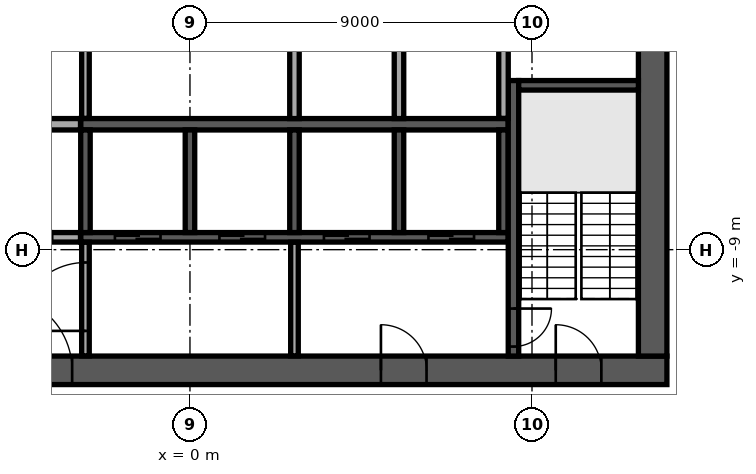
"""IFC4 building model, lengths in metres.
Left out: names, types, materials, properties, quantities, classifications, styles, units other than length and angle.
Written with IfcOpenShell. Run it as: python <this file> out.ifc"""

import sys

from ifc_helpers import new_model, si_unit, direction, frame, frame_2d, origin, place, context, subcontext, project, spatial, rectangle, extrude, element, fill, save


model = new_model("IFC4")
c1 = context("Model", 3, precision=1e-05, world=origin(), true_north=direction((0.0, 1.0)))
c2 = subcontext(c1, "Body", "Model", "MODEL_VIEW")
j1 = project(units=[si_unit("LENGTHUNIT", "METRE"), si_unit("PLANEANGLEUNIT", "RADIAN")], contexts=[c1])
p1 = place(None, origin())
s1 = spatial("IfcSite", under=j1, at=p1, CompositionType="ELEMENT")
p2 = place(p1, origin())
s2 = spatial("IfcBuilding", under=s1, at=p2, CompositionType="ELEMENT")
p3 = place(p2, frame((0.0, 0.0, 246.9)))
s3 = spatial("IfcBuildingStorey", under=s2, at=p3, CompositionType="ELEMENT", Elevation=246.9)
p4 = place(p3, frame((-12.55, -12.175, 0.0), z_axis=(0.0, 0.0, 1.0), x_axis=(1.0, 0.0, 0.0)))
e1 = element("IfcWall", 1, at=p4, inside=s3, PredefinedType="SHEAR", context=c2, shape_type="SweptSolid", body=[
    extrude(rectangle(XDim=25.1, YDim=0.75, at=frame_2d((12.55, 0.0))), origin(), (0.0, 0.0, 1.0), 3.64),
])
p5 = place(p4, frame((7.45, 0.0, 0.0)))
e2 = element("IfcOpeningElement", 2, at=p5, cuts=e1, PredefinedType="OPENING", context=c2, shape_type="SweptSolid", body=[
    extrude(rectangle(XDim=2.0, YDim=2.1, at=frame_2d((1.0, 1.05))), frame((0.0, 0.385, 0.0), z_axis=(0.0, -1.0, 0.0), x_axis=(1.0, 0.0, 0.0)), (0.0, 0.0, 1.0), 0.77),
])
p6 = place(p4, frame((17.575, 0.0, 0.0)))
e3 = element("IfcOpeningElement", 3, at=p6, cuts=e1, PredefinedType="OPENING", context=c2, shape_type="SweptSolid", body=[
    extrude(rectangle(XDim=1.2, YDim=2.1, at=frame_2d((0.6, 1.05))), frame((0.0, 0.385, 0.0), z_axis=(0.0, -1.0, 0.0), x_axis=(1.0, 0.0, 0.0)), (0.0, 0.0, 1.0), 0.77),
])
p7 = place(p4, frame((1.725, 0.0, 0.0)))
e4 = element("IfcOpeningElement", 4, at=p7, cuts=e1, PredefinedType="OPENING", context=c2, shape_type="SweptSolid", body=[
    extrude(rectangle(XDim=1.2, YDim=2.1, at=frame_2d((0.6, 1.05))), frame((0.0, 0.385, 0.0), z_axis=(0.0, -1.0, 0.0), x_axis=(1.0, 0.0, 0.0)), (0.0, 0.0, 1.0), 0.77),
])
p8 = place(p4, frame((22.175, 0.0, 0.0)))
e5 = element("IfcOpeningElement", 5, at=p8, cuts=e1, PredefinedType="OPENING", context=c2, shape_type="SweptSolid", body=[
    extrude(rectangle(XDim=1.2, YDim=2.1, at=frame_2d((0.6, 1.05))), frame((0.0, 0.385, 0.0), z_axis=(0.0, -1.0, 0.0), x_axis=(1.0, 0.0, 0.0)), (0.0, 0.0, 1.0), 0.77),
])
p9 = place(p3, frame((12.175, -11.8, 0.0), z_axis=(0.0, 0.0, 1.0), x_axis=(0.0, 1.0, 0.0)))
e6 = element("IfcWall", 6, at=p9, inside=s3, PredefinedType="SHEAR", context=c2, shape_type="SweptSolid", body=[
    extrude(rectangle(XDim=23.6, YDim=0.75, at=frame_2d((11.8, 0.0))), origin(), (0.0, 0.0, 1.0), 3.64),
])
p10 = place(p9, frame((10.6, 0.0, 0.0)))
e7 = element("IfcOpeningElement", 7, at=p10, cuts=e6, PredefinedType="OPENING", context=c2, shape_type="SweptSolid", body=[
    extrude(rectangle(XDim=2.4, YDim=2.4, at=frame_2d((1.2, 1.2))), frame((0.0, 0.385, 0.0), z_axis=(0.0, -1.0, 0.0), x_axis=(1.0, 0.0, 0.0)), (0.0, 0.0, 1.0), 0.77),
])
p11 = place(p3, frame((-2.875, -5.7, 0.0), z_axis=(0.0, 0.0, 1.0), x_axis=(1.0, 0.0, 0.0)))
e8 = element("IfcWall", 8, at=p11, inside=s3, PredefinedType="SOLIDWALL", context=c2, shape_type="SweptSolid", body=[
    extrude(rectangle(XDim=11.25, YDim=0.3, at=frame_2d((5.625, 0.0))), origin(), (0.0, 0.0, 1.0), 3.64),
])
for number, where, z_axis, x_axis in (
    (9, (2.75, -5.55, 0.0), (0.0, 0.0, 1.0), (0.0, 1.0, 0.0)),
    (10, (5.5, -5.55, 0.0), (0.0, 0.0, 1.0), (0.0, 1.0, 0.0)),
):
    element("IfcWall", number, at=place(p3, frame(where, z_axis=z_axis, x_axis=x_axis)), inside=s3, PredefinedType="SOLIDWALL", context=c2, shape_type="SweptSolid", body=[
        extrude(rectangle(XDim=2.7, YDim=0.25, at=frame_2d((1.35, 0.0))), origin(), (0.0, 0.0, 1.0), 3.64),
    ])
p12 = place(p3, frame((-2.875, -8.675, 0.0), z_axis=(0.0, 0.0, 1.0), x_axis=(1.0, 0.0, 0.0)))
e11 = element("IfcWall", 11, at=p12, inside=s3, PredefinedType="SOLIDWALL", context=c2, shape_type="SweptSolid", body=[
    extrude(rectangle(XDim=11.25, YDim=0.25, at=frame_2d((5.625, 0.0))), origin(), (0.0, 0.0, 1.0), 3.64),
])
p13 = place(p12, frame((0.9, 0.0, 0.0)))
e12 = element("IfcOpeningElement", 12, at=p13, cuts=e11, PredefinedType="OPENING", context=c2, shape_type="SweptSolid", body=[
    extrude(rectangle(XDim=1.2, YDim=2.1, at=frame_2d((0.6, 1.05))), frame((0.0, 0.135, 0.0), z_axis=(0.0, -1.0, 0.0), x_axis=(1.0, 0.0, 0.0)), (0.0, 0.0, 1.0), 0.27),
])
p14 = place(p12, frame((3.65, 0.0, 0.0)))
e13 = element("IfcOpeningElement", 13, at=p14, cuts=e11, PredefinedType="OPENING", context=c2, shape_type="SweptSolid", body=[
    extrude(rectangle(XDim=1.2, YDim=2.1, at=frame_2d((0.6, 1.05))), frame((0.0, 0.135, 0.0), z_axis=(0.0, -1.0, 0.0), x_axis=(1.0, 0.0, 0.0)), (0.0, 0.0, 1.0), 0.27),
])
p15 = place(p12, frame((6.4, 0.0, 0.0)))
e14 = element("IfcOpeningElement", 14, at=p15, cuts=e11, PredefinedType="OPENING", context=c2, shape_type="SweptSolid", body=[
    extrude(rectangle(XDim=1.2, YDim=2.1, at=frame_2d((0.6, 1.05))), frame((0.0, 0.135, 0.0), z_axis=(0.0, -1.0, 0.0), x_axis=(1.0, 0.0, 0.0)), (0.0, 0.0, 1.0), 0.27),
])
p16 = place(p12, frame((9.15, 0.0, 0.0)))
e15 = element("IfcOpeningElement", 15, at=p16, cuts=e11, PredefinedType="OPENING", context=c2, shape_type="SweptSolid", body=[
    extrude(rectangle(XDim=1.2, YDim=2.1, at=frame_2d((0.6, 1.05))), frame((0.0, 0.135, 0.0), z_axis=(0.0, -1.0, 0.0), x_axis=(1.0, 0.0, 0.0)), (0.0, 0.0, 1.0), 0.27),
])
for number, where, z_axis, x_axis in (
    (16, (-2.75, -8.55, 0.0), (0.0, 0.0, 1.0), (0.0, 1.0, 0.0)),
    (17, (0.0, -8.55, 0.0), (0.0, 0.0, 1.0), (0.0, 1.0, 0.0)),
    (18, (2.75, -8.55, 0.0), (0.0, 0.0, 1.0), (0.0, 1.0, 0.0)),
    (19, (5.5, -8.55, 0.0), (0.0, 0.0, 1.0), (0.0, 1.0, 0.0)),
    (20, (8.25, -8.55, 0.0), (0.0, 0.0, 1.0), (0.0, 1.0, 0.0)),
):
    element("IfcWall", number, at=place(p3, frame(where, z_axis=z_axis, x_axis=x_axis)), inside=s3, PredefinedType="SOLIDWALL", context=c2, shape_type="SweptSolid", body=[
        extrude(rectangle(XDim=2.7, YDim=0.25, at=frame_2d((1.35, 0.0))), origin(), (0.0, 0.0, 1.0), 3.64),
    ])
p17 = place(p3, frame((8.512, -4.55, 0.0), z_axis=(0.0, 0.0, 1.0), x_axis=(0.0, -1.0, 0.0)))
e21 = element("IfcWall", 21, at=p17, inside=s3, PredefinedType="SOLIDWALL", context=c2, shape_type="SweptSolid", body=[
    extrude(rectangle(XDim=7.25, YDim=0.275, at=frame_2d((3.625, 0.0))), origin(), (0.0, 0.0, 1.0), 3.64),
])
p18 = place(p17, frame((6.0, 0.0, 0.0)))
e22 = element("IfcOpeningElement", 22, at=p18, cuts=e21, PredefinedType="OPENING", context=c2, shape_type="SweptSolid", body=[
    extrude(rectangle(XDim=1.0, YDim=2.1, at=frame_2d((0.5, 1.05))), frame((0.0, 0.147, 0.0), z_axis=(0.0, -1.0, 0.0), x_axis=(1.0, 0.0, 0.0)), (0.0, 0.0, 1.0), 0.295),
])
p19 = place(p3, frame((8.65, -4.675, 0.0), z_axis=(0.0, 0.0, 1.0), x_axis=(1.0, 0.0, 0.0)))
e23 = element("IfcWall", 23, at=p19, inside=s3, PredefinedType="SOLIDWALL", context=c2, shape_type="SweptSolid", body=[
    extrude(rectangle(XDim=3.15, YDim=0.25, at=frame_2d((1.575, 0.0))), origin(), (0.0, 0.0, 1.0), 3.64),
])
p20 = place(p3, frame((-2.75, -11.795, 0.0), z_axis=(0.0, 0.0, 1.0), x_axis=(0.0, 1.0, 0.0)))
e24 = element("IfcWall", 24, at=p20, inside=s3, PredefinedType="PARTITIONING", context=c2, shape_type="SweptSolid", body=[
    extrude(rectangle(XDim=2.99, YDim=0.2, at=frame_2d((1.495, 0.0))), origin(), (0.0, 0.0, 1.0), 3.64),
])
p21 = place(p20, frame((0.657, 0.0, 0.0)))
e25 = element("IfcOpeningElement", 25, at=p21, cuts=e24, PredefinedType="OPENING", context=c2, shape_type="SweptSolid", body=[
    extrude(rectangle(XDim=1.8, YDim=2.1, at=frame_2d((0.9, 1.05))), frame((0.0, 0.11, 0.0), z_axis=(0.0, -1.0, 0.0), x_axis=(1.0, 0.0, 0.0)), (0.0, 0.0, 1.0), 0.22),
])
p22 = place(p3, frame((2.75, -11.795, 0.0), z_axis=(0.0, 0.0, 1.0), x_axis=(0.0, 1.0, 0.0)))
e26 = element("IfcWall", 26, at=p22, inside=s3, PredefinedType="PARTITIONING", context=c2, shape_type="SweptSolid", body=[
    extrude(rectangle(XDim=2.99, YDim=0.2, at=frame_2d((1.495, 0.0))), origin(), (0.0, 0.0, 1.0), 3.64),
])
p23 = place(p3, frame((-8.37, -8.675, 0.0), z_axis=(0.0, 0.0, 1.0), x_axis=(1.0, 0.0, 0.0)))
e27 = element("IfcWall", 27, at=p23, inside=s3, PredefinedType="PARTITIONING", context=c2, shape_type="SweptSolid", body=[
    extrude(rectangle(XDim=5.49, YDim=0.25, at=frame_2d((2.745, 0.0))), origin(), (0.0, 0.0, 1.0), 3.64),
])
p24 = place(p23, frame((0.995, 0.0, 0.0)))
e28 = element("IfcOpeningElement", 28, at=p24, cuts=e27, PredefinedType="OPENING", context=c2, shape_type="SweptSolid", body=[
    extrude(rectangle(XDim=1.0, YDim=2.1, at=frame_2d((0.5, 1.05))), frame((0.0, 0.135, 0.0), z_axis=(0.0, -1.0, 0.0), x_axis=(1.0, 0.0, 0.0)), (0.0, 0.0, 1.0), 0.27),
])
p25 = place(p23, frame((3.745, 0.0, 0.0)))
e29 = element("IfcOpeningElement", 29, at=p25, cuts=e27, PredefinedType="OPENING", context=c2, shape_type="SweptSolid", body=[
    extrude(rectangle(XDim=1.0, YDim=2.1, at=frame_2d((0.5, 1.05))), frame((0.0, 0.135, 0.0), z_axis=(0.0, -1.0, 0.0), x_axis=(1.0, 0.0, 0.0)), (0.0, 0.0, 1.0), 0.27),
])
p26 = place(p3, frame((-8.35, -5.7, 0.0), z_axis=(0.0, 0.0, 1.0), x_axis=(1.0, 0.0, 0.0)))
e30 = element("IfcWall", 30, at=p26, inside=s3, PredefinedType="PARTITIONING", context=c2, shape_type="SweptSolid", body=[
    extrude(rectangle(XDim=5.47, YDim=0.3, at=frame_2d((2.735, 0.0))), origin(), (0.0, 0.0, 1.0), 3.64),
])
p27 = place(p3, frame((-2.75, -5.545, 0.0), z_axis=(0.0, 0.0, 1.0), x_axis=(0.0, 1.0, 0.0)))
e31 = element("IfcWall", 31, at=p27, inside=s3, PredefinedType="PARTITIONING", context=c2, shape_type="SweptSolid", body=[
    extrude(rectangle(XDim=2.69, YDim=0.2, at=frame_2d((1.345, 0.0))), origin(), (0.0, 0.0, 1.0), 3.64),
])
p28 = place(p3, frame((8.25, -5.545, 0.0), z_axis=(0.0, 0.0, 1.0), x_axis=(0.0, 1.0, 0.0)))
e32 = element("IfcWall", 32, at=p28, inside=s3, PredefinedType="PARTITIONING", context=c2, shape_type="SweptSolid", body=[
    extrude(rectangle(XDim=2.69, YDim=0.25, at=frame_2d((1.345, 0.0))), origin(), (0.0, 0.0, 1.0), 3.64),
])
p29 = place(p3, frame((5.206, -33.362, 0.0), z_axis=(0.0, 0.0, 1.0), x_axis=(0.573577438409, 0.81915134264, 0.0)))
e33 = element("IfcWall", 33, at=p29, inside=s3, PredefinedType="STANDARD", context=c2, shape_type="SweptSolid", body=[
    extrude(rectangle(XDim=48.686, YDim=0.6, at=frame_2d((24.343, 0.0))), origin(), (0.0, 0.0, 1.0), 3.64),
])
p30 = place(p29, frame((1.213, 0.0, 0.9)))
e34 = element("IfcOpeningElement", 34, at=p30, cuts=e33, PredefinedType="OPENING", context=c2, shape_type="SweptSolid", body=[
    extrude(rectangle(XDim=2.0, YDim=2.1, at=frame_2d((1.0, 1.05))), frame((0.0, 0.31, 0.0), z_axis=(0.0, -1.0, 0.0), x_axis=(1.0, 0.0, 0.0)), (0.0, 0.0, 1.0), 0.62),
])
p31 = place(p29, frame((5.639, 0.0, 0.9)))
e35 = element("IfcOpeningElement", 35, at=p31, cuts=e33, PredefinedType="OPENING", context=c2, shape_type="SweptSolid", body=[
    extrude(rectangle(XDim=2.0, YDim=2.1, at=frame_2d((1.0, 1.05))), frame((0.0, 0.31, 0.0), z_axis=(0.0, -1.0, 0.0), x_axis=(1.0, 0.0, 0.0)), (0.0, 0.0, 1.0), 0.62),
])
p32 = place(p29, frame((10.065, 0.0, 0.9)))
e36 = element("IfcOpeningElement", 36, at=p32, cuts=e33, PredefinedType="OPENING", context=c2, shape_type="SweptSolid", body=[
    extrude(rectangle(XDim=2.0, YDim=2.1, at=frame_2d((1.0, 1.05))), frame((0.0, 0.31, 0.0), z_axis=(0.0, -1.0, 0.0), x_axis=(1.0, 0.0, 0.0)), (0.0, 0.0, 1.0), 0.62),
])
p33 = place(p29, frame((14.491, 0.0, 0.9)))
e37 = element("IfcOpeningElement", 37, at=p33, cuts=e33, PredefinedType="OPENING", context=c2, shape_type="SweptSolid", body=[
    extrude(rectangle(XDim=2.0, YDim=2.1, at=frame_2d((1.0, 1.05))), frame((0.0, 0.31, 0.0), z_axis=(0.0, -1.0, 0.0), x_axis=(1.0, 0.0, 0.0)), (0.0, 0.0, 1.0), 0.62),
])
p34 = place(p29, frame((18.917, 0.0, 0.9)))
e38 = element("IfcOpeningElement", 38, at=p34, cuts=e33, PredefinedType="OPENING", context=c2, shape_type="SweptSolid", body=[
    extrude(rectangle(XDim=2.0, YDim=2.1, at=frame_2d((1.0, 1.05))), frame((0.0, 0.31, 0.0), z_axis=(0.0, -1.0, 0.0), x_axis=(1.0, 0.0, 0.0)), (0.0, 0.0, 1.0), 0.62),
])
p35 = place(p29, frame((23.343, 0.0, 0.9)))
e39 = element("IfcOpeningElement", 39, at=p35, cuts=e33, PredefinedType="OPENING", context=c2, shape_type="SweptSolid", body=[
    extrude(rectangle(XDim=2.0, YDim=2.1, at=frame_2d((1.0, 1.05))), frame((0.0, 0.31, 0.0), z_axis=(0.0, -1.0, 0.0), x_axis=(1.0, 0.0, 0.0)), (0.0, 0.0, 1.0), 0.62),
])
p36 = place(p29, frame((27.769, 0.0, 0.9)))
e40 = element("IfcOpeningElement", 40, at=p36, cuts=e33, PredefinedType="OPENING", context=c2, shape_type="SweptSolid", body=[
    extrude(rectangle(XDim=2.0, YDim=2.1, at=frame_2d((1.0, 1.05))), frame((0.0, 0.31, 0.0), z_axis=(0.0, -1.0, 0.0), x_axis=(1.0, 0.0, 0.0)), (0.0, 0.0, 1.0), 0.62),
])
p37 = place(p29, frame((32.195, 0.0, 0.9)))
e41 = element("IfcOpeningElement", 41, at=p37, cuts=e33, PredefinedType="OPENING", context=c2, shape_type="SweptSolid", body=[
    extrude(rectangle(XDim=2.0, YDim=2.1, at=frame_2d((1.0, 1.05))), frame((0.0, 0.31, 0.0), z_axis=(0.0, -1.0, 0.0), x_axis=(1.0, 0.0, 0.0)), (0.0, 0.0, 1.0), 0.62),
])
p38 = place(p29, frame((36.621, 0.0, 0.9)))
e42 = element("IfcOpeningElement", 42, at=p38, cuts=e33, PredefinedType="OPENING", context=c2, shape_type="SweptSolid", body=[
    extrude(rectangle(XDim=2.0, YDim=2.1, at=frame_2d((1.0, 1.05))), frame((0.0, 0.31, 0.0), z_axis=(0.0, -1.0, 0.0), x_axis=(1.0, 0.0, 0.0)), (0.0, 0.0, 1.0), 0.62),
])
p39 = place(p29, frame((41.047, 0.0, 0.9)))
e43 = element("IfcOpeningElement", 43, at=p39, cuts=e33, PredefinedType="OPENING", context=c2, shape_type="SweptSolid", body=[
    extrude(rectangle(XDim=2.0, YDim=2.1, at=frame_2d((1.0, 1.05))), frame((0.0, 0.31, 0.0), z_axis=(0.0, -1.0, 0.0), x_axis=(1.0, 0.0, 0.0)), (0.0, 0.0, 1.0), 0.62),
])
p40 = place(p29, frame((45.473, 0.0, 0.9)))
e44 = element("IfcOpeningElement", 44, at=p40, cuts=e33, PredefinedType="OPENING", context=c2, shape_type="SweptSolid", body=[
    extrude(rectangle(XDim=2.0, YDim=2.1, at=frame_2d((1.0, 1.05))), frame((0.0, 0.31, 0.0), z_axis=(0.0, -1.0, 0.0), x_axis=(1.0, 0.0, 0.0)), (0.0, 0.0, 1.0), 0.62),
])
p41 = place(p3, frame((-26.231, -7.537, 0.0), z_axis=(0.0, 0.0, 1.0), x_axis=(0.819166569978, -0.573555690959, 0.0)))
e45 = element("IfcWall", 45, at=p41, inside=s3, PredefinedType="PARTITIONING", context=c2, shape_type="SweptSolid", body=[
    extrude(rectangle(XDim=34.403, YDim=0.15, at=frame_2d((17.201, 0.0))), origin(), (0.0, 0.0, 1.0), 3.24),
])
p42 = place(p41, frame((3.05, 0.0, 0.0)))
e46 = element("IfcOpeningElement", 46, at=p42, cuts=e45, PredefinedType="OPENING", context=c2, shape_type="SweptSolid", body=[
    extrude(rectangle(XDim=1.8, YDim=2.1, at=frame_2d((0.9, 1.05))), frame((0.0, 0.085, 0.0), z_axis=(0.0, -1.0, 0.0), x_axis=(1.0, 0.0, 0.0)), (0.0, 0.0, 1.0), 0.17),
])
p43 = place(p41, frame((13.103, 0.0, 0.0)))
e47 = element("IfcOpeningElement", 47, at=p43, cuts=e45, PredefinedType="OPENING", context=c2, shape_type="SweptSolid", body=[
    extrude(rectangle(XDim=1.0, YDim=2.1, at=frame_2d((0.5, 1.05))), frame((0.0, 0.085, 0.0), z_axis=(0.0, -1.0, 0.0), x_axis=(1.0, 0.0, 0.0)), (0.0, 0.0, 1.0), 0.17),
])
p44 = place(p41, frame((19.173, 0.0, 0.0)))
e48 = element("IfcOpeningElement", 48, at=p44, cuts=e45, PredefinedType="OPENING", context=c2, shape_type="SweptSolid", body=[
    extrude(rectangle(XDim=1.0, YDim=2.1, at=frame_2d((0.5, 1.05))), frame((0.0, 0.085, 0.0), z_axis=(0.0, -1.0, 0.0), x_axis=(1.0, 0.0, 0.0)), (0.0, 0.0, 1.0), 0.17),
])
p45 = place(p5, origin())
e49 = element("IfcDoor", 49, at=p45, inside=s3, OperationType="SINGLE_SWING_LEFT", PredefinedType="DOOR", context=c2, shape_type="SweptSolid", body=[
    extrude(rectangle(XDim=2.0, YDim=2.1, at=frame_2d((1.0, 1.05))), frame((0.0, 0.025, 0.0), z_axis=(0.0, -1.0, 0.0), x_axis=(1.0, 0.0, 0.0)), (0.0, 0.0, 1.0), 0.05),
])
fill(e2, e49)
p46 = place(p6, origin())
e50 = element("IfcDoor", 50, at=p46, inside=s3, OperationType="SINGLE_SWING_LEFT", PredefinedType="DOOR", context=c2, shape_type="SweptSolid", body=[
    extrude(rectangle(XDim=1.2, YDim=2.1, at=frame_2d((0.6, 1.05))), frame((0.0, 0.025, 0.0), z_axis=(0.0, -1.0, 0.0), x_axis=(1.0, 0.0, 0.0)), (0.0, 0.0, 1.0), 0.05),
])
fill(e3, e50)
p47 = place(p8, origin())
e51 = element("IfcDoor", 51, at=p47, inside=s3, OperationType="SINGLE_SWING_LEFT", PredefinedType="DOOR", context=c2, shape_type="SweptSolid", body=[
    extrude(rectangle(XDim=1.2, YDim=2.1, at=frame_2d((0.6, 1.05))), frame((0.0, 0.025, 0.0), z_axis=(0.0, -1.0, 0.0), x_axis=(1.0, 0.0, 0.0)), (0.0, 0.0, 1.0), 0.05),
])
fill(e5, e51)
p48 = place(p13, origin())
e52 = element("IfcDoor", 52, at=p48, inside=s3, OperationType="DOUBLE_DOOR_SLIDING", PredefinedType="DOOR", context=c2, shape_type="SweptSolid", body=[
    extrude(rectangle(XDim=1.2, YDim=2.1, at=frame_2d((0.6, 1.05))), frame((0.0, 0.025, 0.0), z_axis=(0.0, -1.0, 0.0), x_axis=(1.0, 0.0, 0.0)), (0.0, 0.0, 1.0), 0.05),
])
fill(e12, e52)
p49 = place(p14, origin())
e53 = element("IfcDoor", 53, at=p49, inside=s3, OperationType="DOUBLE_DOOR_SLIDING", PredefinedType="DOOR", context=c2, shape_type="SweptSolid", body=[
    extrude(rectangle(XDim=1.2, YDim=2.1, at=frame_2d((0.6, 1.05))), frame((0.0, 0.025, 0.0), z_axis=(0.0, -1.0, 0.0), x_axis=(1.0, 0.0, 0.0)), (0.0, 0.0, 1.0), 0.05),
])
fill(e13, e53)
p50 = place(p15, origin())
e54 = element("IfcDoor", 54, at=p50, inside=s3, OperationType="DOUBLE_DOOR_SLIDING", PredefinedType="DOOR", context=c2, shape_type="SweptSolid", body=[
    extrude(rectangle(XDim=1.2, YDim=2.1, at=frame_2d((0.6, 1.05))), frame((0.0, 0.025, 0.0), z_axis=(0.0, -1.0, 0.0), x_axis=(1.0, 0.0, 0.0)), (0.0, 0.0, 1.0), 0.05),
])
fill(e14, e54)
p51 = place(p16, origin())
e55 = element("IfcDoor", 55, at=p51, inside=s3, OperationType="DOUBLE_DOOR_SLIDING", PredefinedType="DOOR", context=c2, shape_type="SweptSolid", body=[
    extrude(rectangle(XDim=1.2, YDim=2.1, at=frame_2d((0.6, 1.05))), frame((0.0, 0.025, 0.0), z_axis=(0.0, -1.0, 0.0), x_axis=(1.0, 0.0, 0.0)), (0.0, 0.0, 1.0), 0.05),
])
fill(e15, e55)
p52 = place(p18, origin())
e56 = element("IfcDoor", 56, at=p52, inside=s3, OperationType="SINGLE_SWING_LEFT", PredefinedType="DOOR", context=c2, shape_type="SweptSolid", body=[
    extrude(rectangle(XDim=1.0, YDim=2.1, at=frame_2d((0.5, 1.05))), frame((0.0, 0.025, 0.0), z_axis=(0.0, -1.0, 0.0), x_axis=(1.0, 0.0, 0.0)), (0.0, 0.0, 1.0), 0.05),
])
fill(e22, e56)
p53 = place(p21, origin())
e57 = element("IfcDoor", 57, at=p53, inside=s3, OperationType="SINGLE_SWING_LEFT", PredefinedType="DOOR", context=c2, shape_type="SweptSolid", body=[
    extrude(rectangle(XDim=1.8, YDim=2.1, at=frame_2d((0.9, 1.05))), frame((0.0, 0.025, 0.0), z_axis=(0.0, -1.0, 0.0), x_axis=(1.0, 0.0, 0.0)), (0.0, 0.0, 1.0), 0.05),
])
fill(e25, e57)
save(model, sys.argv[1])
